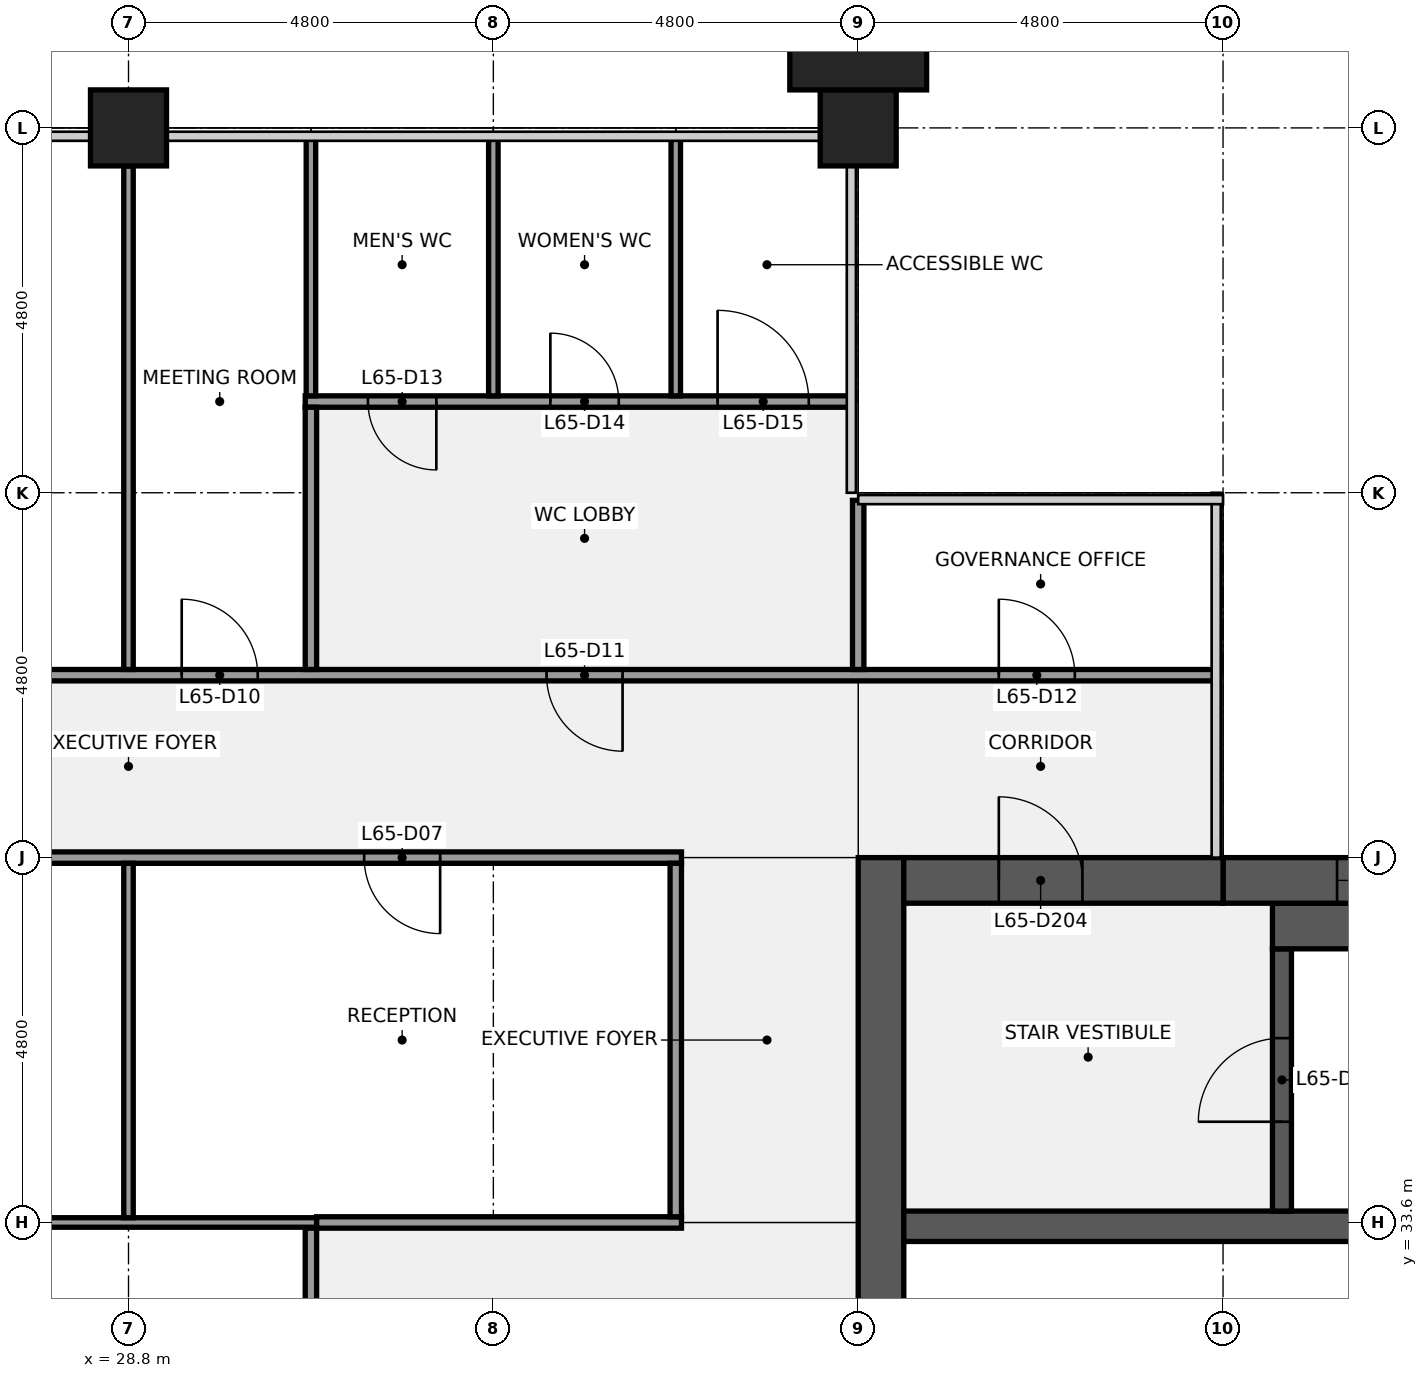
"""IFC4 building model, lengths in metres.
Left out: names, types, materials, properties, quantities, classifications, styles, units other than length and angle.
Written with IfcOpenShell. Run it as: python <this file> out.ifc"""

import sys

from ifc_helpers import new_model, si_unit, direction, frame, frame_2d, origin, origin_2d, place, context, subcontext, project, spatial, rectangle, extrude, element, fill, save


model = new_model("IFC4")
c1 = context("Model", 3, precision=1e-05, world=origin(), true_north=direction((0.0, 1.0)))
c2 = subcontext(c1, "Body", "Model", "MODEL_VIEW")
j1 = project(units=[si_unit("LENGTHUNIT", "METRE"), si_unit("PLANEANGLEUNIT", "RADIAN")], contexts=[c1])
p1 = place(None, origin())
s1 = spatial("IfcSite", under=j1, at=p1, CompositionType="ELEMENT")
p2 = place(p1, origin())
s2 = spatial("IfcBuilding", under=s1, at=p2, CompositionType="ELEMENT")
p3 = place(p2, frame((0.0, 0.0, 298.3)))
s3 = spatial("IfcBuildingStorey", under=s2, at=p3, CompositionType="ELEMENT", Elevation=298.3)
for number, where, z_axis, x_axis in (
    (1, (28.8, 48.0, 0.0), (0.0, 0.0, 1.0), (1.0, 0.0, 0.0)),
    (2, (38.4, 48.0, 0.0), (0.0, 0.0, 1.0), (1.0, 0.0, 0.0)),
):
    element("IfcColumn", number, at=place(p3, frame(where, z_axis=z_axis, x_axis=x_axis)), inside=s3, PredefinedType="COLUMN", context=c2, shape_type="SweptSolid", body=[
        extrude(rectangle(XDim=1.0, YDim=1.0, at=origin_2d()), origin(), (0.0, 0.0, 1.0), 4.0),
    ])
p4 = place(p3, frame((38.7, 9.6, 0.0), z_axis=(0.0, 0.0, 1.0), x_axis=(0.0, 1.0, 0.0)))
e3 = element("IfcWall", 3, at=p4, inside=s3, PredefinedType="SHEAR", context=c2, shape_type="SweptSolid", body=[
    extrude(rectangle(XDim=28.8, YDim=0.6, at=frame_2d((14.4, 0.0))), origin(), (0.0, 0.0, 1.0), 3.84),
])
p5 = place(p4, frame((8.7, 0.0, 0.0)))
e4 = element("IfcOpeningElement", 4, at=p5, cuts=e3, PredefinedType="OPENING", context=c2, shape_type="SweptSolid", body=[
    extrude(rectangle(XDim=1.8, YDim=2.1, at=frame_2d((0.9, 1.05))), frame((0.0, 0.31, 0.0), z_axis=(0.0, -1.0, 0.0), x_axis=(1.0, 0.0, 0.0)), (0.0, 0.0, 1.0), 0.62),
])
p6 = place(p4, frame((18.3, 0.0, 0.0)))
e5 = element("IfcOpeningElement", 5, at=p6, cuts=e3, PredefinedType="OPENING", context=c2, shape_type="SweptSolid", body=[
    extrude(rectangle(XDim=1.8, YDim=2.1, at=frame_2d((0.9, 1.05))), frame((0.0, 0.31, 0.0), z_axis=(0.0, -1.0, 0.0), x_axis=(1.0, 0.0, 0.0)), (0.0, 0.0, 1.0), 0.62),
])
p7 = place(p3, frame((39.0, 33.55, 0.0), z_axis=(0.0, 0.0, 1.0), x_axis=(1.0, 0.0, 0.0)))
e6 = element("IfcWall", 6, at=p7, inside=s3, PredefinedType="SHEAR", context=c2, shape_type="SweptSolid", body=[
    extrude(rectangle(XDim=18.0, YDim=0.4, at=frame_2d((9.0, 0.0))), origin(), (0.0, 0.0, 1.0), 3.84),
])
p8 = place(p3, frame((43.975, 33.75, 0.0), z_axis=(0.0, 0.0, 1.0), x_axis=(0.0, 1.0, 0.0)))
e7 = element("IfcWall", 7, at=p8, inside=s3, PredefinedType="SHEAR", context=c2, shape_type="SweptSolid", body=[
    extrude(rectangle(XDim=3.45, YDim=0.25, at=frame_2d((1.725, 0.0))), origin(), (0.0, 0.0, 1.0), 3.84),
])
p9 = place(p8, frame((1.175, 0.0, 0.0)))
e8 = element("IfcOpeningElement", 8, at=p9, cuts=e7, PredefinedType="OPENING", context=c2, shape_type="SweptSolid", body=[
    extrude(rectangle(XDim=1.1, YDim=2.1, at=frame_2d((0.55, 1.05))), frame((0.0, 0.135, 0.0), z_axis=(0.0, -1.0, 0.0), x_axis=(1.0, 0.0, 0.0)), (0.0, 0.0, 1.0), 0.27),
])
p10 = place(p3, frame((43.85, 37.5, 0.0), z_axis=(0.0, 0.0, 1.0), x_axis=(1.0, 0.0, 0.0)))
e9 = element("IfcWall", 9, at=p10, inside=s3, PredefinedType="SHEAR", context=c2, shape_type="SweptSolid", body=[
    extrude(rectangle(XDim=7.5, YDim=0.6, at=frame_2d((3.75, 0.0))), origin(), (0.0, 0.0, 1.0), 3.84),
])
p11 = place(p3, frame((43.2, 38.1, 0.0), z_axis=(0.0, 0.0, 1.0), x_axis=(1.0, 0.0, 0.0)))
e10 = element("IfcWall", 10, at=p11, inside=s3, PredefinedType="SHEAR", context=c2, shape_type="SweptSolid", body=[
    extrude(rectangle(XDim=13.8, YDim=0.6, at=frame_2d((6.9, 0.0))), origin(), (0.0, 0.0, 1.0), 3.84),
])
p12 = place(p11, frame((6.3, 0.0, 0.9)))
e11 = element("IfcOpeningElement", 11, at=p12, cuts=e10, PredefinedType="OPENING", context=c2, shape_type="SweptSolid", body=[
    extrude(rectangle(XDim=1.8, YDim=1.5, at=frame_2d((0.9, 0.75))), frame((0.0, 0.31, 0.0), z_axis=(0.0, -1.0, 0.0), x_axis=(1.0, 0.0, 0.0)), (0.0, 0.0, 1.0), 0.62),
])
p13 = place(p11, frame((1.5, 0.0, 0.9)))
e12 = element("IfcOpeningElement", 12, at=p13, cuts=e10, PredefinedType="OPENING", context=c2, shape_type="SweptSolid", body=[
    extrude(rectangle(XDim=1.8, YDim=1.5, at=frame_2d((0.9, 0.75))), frame((0.0, 0.31, 0.0), z_axis=(0.0, -1.0, 0.0), x_axis=(1.0, 0.0, 0.0)), (0.0, 0.0, 1.0), 0.62),
])
p14 = place(p3, frame((39.0, 38.1, 0.0), z_axis=(0.0, 0.0, 1.0), x_axis=(1.0, 0.0, 0.0)))
e13 = element("IfcWall", 13, at=p14, inside=s3, PredefinedType="SHEAR", context=c2, shape_type="SweptSolid", body=[
    extrude(rectangle(XDim=4.2, YDim=0.6, at=frame_2d((2.1, 0.0))), origin(), (0.0, 0.0, 1.0), 3.84),
])
p15 = place(p14, frame((1.25, 0.0, 0.0)))
e14 = element("IfcOpeningElement", 14, at=p15, cuts=e13, PredefinedType="OPENING", context=c2, shape_type="SweptSolid", body=[
    extrude(rectangle(XDim=1.1, YDim=2.1, at=frame_2d((0.55, 1.05))), frame((0.0, 0.31, 0.0), z_axis=(0.0, -1.0, 0.0), x_axis=(1.0, 0.0, 0.0)), (0.0, 0.0, 1.0), 0.62),
])
p16 = place(p3, frame((26.475, 33.6, 0.0), z_axis=(0.0, 0.0, 1.0), x_axis=(1.0, 0.0, 0.0)))
e15 = element("IfcWall", 15, at=p16, inside=s3, PredefinedType="PARTITIONING", context=c2, shape_type="SweptSolid", body=[
    extrude(rectangle(XDim=4.8, YDim=0.125, at=frame_2d((2.4, 0.0))), origin(), (0.0, 0.0, 1.0), 2.849),
])
p17 = place(p3, frame((31.275, 33.6, 0.0), z_axis=(0.0, 0.0, 1.0), x_axis=(1.0, 0.0, 0.0)))
e16 = element("IfcWall", 16, at=p17, inside=s3, PredefinedType="PARTITIONING", context=c2, shape_type="SweptSolid", body=[
    extrude(rectangle(XDim=4.8, YDim=0.15, at=frame_2d((2.4, 0.0))), origin(), (0.0, 0.0, 1.0), 2.849),
])
p18 = place(p3, frame((21.525, 38.4, 0.0), z_axis=(0.0, 0.0, 1.0), x_axis=(1.0, 0.0, 0.0)))
e17 = element("IfcWall", 17, at=p18, inside=s3, PredefinedType="PARTITIONING", context=c2, shape_type="SweptSolid", body=[
    extrude(rectangle(XDim=14.55, YDim=0.15, at=frame_2d((7.275, 0.0))), origin(), (0.0, 0.0, 1.0), 2.849),
])
p19 = place(p18, frame((3.175, 0.0, 0.0)))
e18 = element("IfcOpeningElement", 18, at=p19, cuts=e17, PredefinedType="OPENING", context=c2, shape_type="SweptSolid", body=[
    extrude(rectangle(XDim=1.0, YDim=2.1, at=frame_2d((0.5, 1.05))), frame((0.0, 0.085, 0.0), z_axis=(0.0, -1.0, 0.0), x_axis=(1.0, 0.0, 0.0)), (0.0, 0.0, 1.0), 0.17),
])
p20 = place(p18, frame((10.375, 0.0, 0.0)))
e19 = element("IfcOpeningElement", 19, at=p20, cuts=e17, PredefinedType="OPENING", context=c2, shape_type="SweptSolid", body=[
    extrude(rectangle(XDim=1.0, YDim=2.1, at=frame_2d((0.5, 1.05))), frame((0.0, 0.085, 0.0), z_axis=(0.0, -1.0, 0.0), x_axis=(1.0, 0.0, 0.0)), (0.0, 0.0, 1.0), 0.17),
])
p21 = place(p3, frame((14.5, 40.8, 0.0), z_axis=(0.0, 0.0, 1.0), x_axis=(1.0, 0.0, 0.0)))
e20 = element("IfcWall", 20, at=p21, inside=s3, PredefinedType="PARTITIONING", context=c2, shape_type="SweptSolid", body=[
    extrude(rectangle(XDim=28.6, YDim=0.15, at=frame_2d((14.3, 0.0))), origin(), (0.0, 0.0, 1.0), 2.849),
])
p22 = place(p21, frame((1.85, 0.0, 0.0)))
e21 = element("IfcOpeningElement", 21, at=p22, cuts=e20, PredefinedType="OPENING", context=c2, shape_type="SweptSolid", body=[
    extrude(rectangle(XDim=1.0, YDim=2.1, at=frame_2d((0.5, 1.05))), frame((0.0, 0.085, 0.0), z_axis=(0.0, -1.0, 0.0), x_axis=(1.0, 0.0, 0.0)), (0.0, 0.0, 1.0), 0.17),
])
p23 = place(p21, frame((9.0, 0.0, 0.0)))
e22 = element("IfcOpeningElement", 22, at=p23, cuts=e20, PredefinedType="OPENING", context=c2, shape_type="SweptSolid", body=[
    extrude(rectangle(XDim=1.0, YDim=2.1, at=frame_2d((0.5, 1.05))), frame((0.0, 0.085, 0.0), z_axis=(0.0, -1.0, 0.0), x_axis=(1.0, 0.0, 0.0)), (0.0, 0.0, 1.0), 0.17),
])
p24 = place(p21, frame((15.0, 0.0, 0.0)))
e23 = element("IfcOpeningElement", 23, at=p24, cuts=e20, PredefinedType="OPENING", context=c2, shape_type="SweptSolid", body=[
    extrude(rectangle(XDim=1.0, YDim=2.1, at=frame_2d((0.5, 1.05))), frame((0.0, 0.085, 0.0), z_axis=(0.0, -1.0, 0.0), x_axis=(1.0, 0.0, 0.0)), (0.0, 0.0, 1.0), 0.17),
])
p25 = place(p21, frame((19.8, 0.0, 0.0)))
e24 = element("IfcOpeningElement", 24, at=p25, cuts=e20, PredefinedType="OPENING", context=c2, shape_type="SweptSolid", body=[
    extrude(rectangle(XDim=1.0, YDim=2.1, at=frame_2d((0.5, 1.05))), frame((0.0, 0.085, 0.0), z_axis=(0.0, -1.0, 0.0), x_axis=(1.0, 0.0, 0.0)), (0.0, 0.0, 1.0), 0.17),
])
p26 = place(p21, frame((25.75, 0.0, 0.0)))
e25 = element("IfcOpeningElement", 25, at=p26, cuts=e20, PredefinedType="OPENING", context=c2, shape_type="SweptSolid", body=[
    extrude(rectangle(XDim=1.0, YDim=2.1, at=frame_2d((0.5, 1.05))), frame((0.0, 0.085, 0.0), z_axis=(0.0, -1.0, 0.0), x_axis=(1.0, 0.0, 0.0)), (0.0, 0.0, 1.0), 0.17),
])
p27 = place(p3, frame((31.125, 44.4, 0.0), z_axis=(0.0, 0.0, 1.0), x_axis=(1.0, 0.0, 0.0)))
e26 = element("IfcWall", 26, at=p27, inside=s3, PredefinedType="PARTITIONING", context=c2, shape_type="SweptSolid", body=[
    extrude(rectangle(XDim=7.175, YDim=0.15, at=frame_2d((3.587, 0.0))), origin(), (0.0, 0.0, 1.0), 2.849),
])
p28 = place(p27, frame((0.825, 0.0, 0.0)))
e27 = element("IfcOpeningElement", 27, at=p28, cuts=e26, PredefinedType="OPENING", context=c2, shape_type="SweptSolid", body=[
    extrude(rectangle(XDim=0.9, YDim=2.1, at=frame_2d((0.45, 1.05))), frame((0.0, 0.085, 0.0), z_axis=(0.0, -1.0, 0.0), x_axis=(1.0, 0.0, 0.0)), (0.0, 0.0, 1.0), 0.17),
])
p29 = place(p27, frame((3.225, 0.0, 0.0)))
e28 = element("IfcOpeningElement", 28, at=p29, cuts=e26, PredefinedType="OPENING", context=c2, shape_type="SweptSolid", body=[
    extrude(rectangle(XDim=0.9, YDim=2.1, at=frame_2d((0.45, 1.05))), frame((0.0, 0.085, 0.0), z_axis=(0.0, -1.0, 0.0), x_axis=(1.0, 0.0, 0.0)), (0.0, 0.0, 1.0), 0.17),
])
p30 = place(p27, frame((5.425, 0.0, 0.0)))
e29 = element("IfcOpeningElement", 29, at=p30, cuts=e26, PredefinedType="OPENING", context=c2, shape_type="SweptSolid", body=[
    extrude(rectangle(XDim=1.2, YDim=2.1, at=frame_2d((0.6, 1.05))), frame((0.0, 0.085, 0.0), z_axis=(0.0, -1.0, 0.0), x_axis=(1.0, 0.0, 0.0)), (0.0, 0.0, 1.0), 0.17),
])
p31 = place(p3, frame((28.8, 33.663, 0.0), z_axis=(0.0, 0.0, 1.0), x_axis=(0.0, 1.0, 0.0)))
e30 = element("IfcWall", 30, at=p31, inside=s3, PredefinedType="PARTITIONING", context=c2, shape_type="SweptSolid", body=[
    extrude(rectangle(XDim=4.662, YDim=0.125, at=frame_2d((2.331, 0.0))), origin(), (0.0, 0.0, 1.0), 2.849),
])
p32 = place(p3, frame((28.8, 40.875, 0.0), z_axis=(0.0, 0.0, 1.0), x_axis=(0.0, 1.0, 0.0)))
e31 = element("IfcWall", 31, at=p32, inside=s3, PredefinedType="PARTITIONING", context=c2, shape_type="SweptSolid", body=[
    extrude(rectangle(XDim=6.625, YDim=0.125, at=frame_2d((3.312, 0.0))), origin(), (0.0, 0.0, 1.0), 2.849),
])
p33 = place(p3, frame((31.2, 44.475, 0.0), z_axis=(0.0, 0.0, 1.0), x_axis=(0.0, 1.0, 0.0)))
e32 = element("IfcWall", 32, at=p33, inside=s3, PredefinedType="PARTITIONING", context=c2, shape_type="SweptSolid", body=[
    extrude(rectangle(XDim=3.425, YDim=0.125, at=frame_2d((1.712, 0.0))), origin(), (0.0, 0.0, 1.0), 2.849),
])
p34 = place(p3, frame((31.2, 26.475, 0.0), z_axis=(0.0, 0.0, 1.0), x_axis=(0.0, 1.0, 0.0)))
e33 = element("IfcWall", 33, at=p34, inside=s3, PredefinedType="PARTITIONING", context=c2, shape_type="SweptSolid", body=[
    extrude(rectangle(XDim=7.05, YDim=0.15, at=frame_2d((3.525, 0.0))), origin(), (0.0, 0.0, 1.0), 2.849),
])
p35 = place(p3, frame((31.2, 40.875, 0.0), z_axis=(0.0, 0.0, 1.0), x_axis=(0.0, 1.0, 0.0)))
e34 = element("IfcWall", 34, at=p35, inside=s3, PredefinedType="PARTITIONING", context=c2, shape_type="SweptSolid", body=[
    extrude(rectangle(XDim=3.45, YDim=0.15, at=frame_2d((1.725, 0.0))), origin(), (0.0, 0.0, 1.0), 2.849),
])
for number, where, z_axis, x_axis in (
    (35, (33.6, 44.475, 0.0), (0.0, 0.0, 1.0), (0.0, 1.0, 0.0)),
    (36, (36.0, 44.475, 0.0), (0.0, 0.0, 1.0), (0.0, 1.0, 0.0)),
):
    element("IfcWall", number, at=place(p3, frame(where, z_axis=z_axis, x_axis=x_axis)), inside=s3, PredefinedType="PARTITIONING", context=c2, shape_type="SweptSolid", body=[
        extrude(rectangle(XDim=3.425, YDim=0.125, at=frame_2d((1.712, 0.0))), origin(), (0.0, 0.0, 1.0), 2.849),
    ])
p36 = place(p3, frame((36.0, 33.675, 0.0), z_axis=(0.0, 0.0, 1.0), x_axis=(0.0, 1.0, 0.0)))
e37 = element("IfcWall", 37, at=p36, inside=s3, PredefinedType="PARTITIONING", context=c2, shape_type="SweptSolid", body=[
    extrude(rectangle(XDim=4.65, YDim=0.15, at=frame_2d((2.325, 0.0))), origin(), (0.0, 0.0, 1.0), 2.849),
])
p37 = place(p3, frame((38.4, 40.875, 0.0), z_axis=(0.0, 0.0, 1.0), x_axis=(0.0, 1.0, 0.0)))
e38 = element("IfcWall", 38, at=p37, inside=s3, PredefinedType="PARTITIONING", context=c2, shape_type="SweptSolid", body=[
    extrude(rectangle(XDim=2.225, YDim=0.15, at=frame_2d((1.113, 0.0))), origin(), (0.0, 0.0, 1.0), 2.849),
])
p38 = place(p3, frame((38.4, 49.0, 0.0), z_axis=(0.0, 0.0, 1.0), x_axis=(1.0, 0.0, 0.0)))
e39 = element("IfcColumn", 39, at=p38, inside=s3, PredefinedType="PILASTER", context=c2, shape_type="SweptSolid", body=[
    extrude(rectangle(XDim=1.8, YDim=1.0, at=origin_2d()), origin(), (0.0, 0.0, 1.0), 4.0),
])
p39 = place(p9, origin())
e40 = element("IfcDoor", 40, at=p39, inside=s3, OperationType="SINGLE_SWING_LEFT", PredefinedType="DOOR", context=c2, shape_type="SweptSolid", body=[
    extrude(rectangle(XDim=1.1, YDim=2.1, at=frame_2d((0.55, 1.05))), frame((0.0, 0.025, 0.0), z_axis=(0.0, -1.0, 0.0), x_axis=(1.0, 0.0, 0.0)), (0.0, 0.0, 1.0), 0.05),
])
fill(e8, e40)
p40 = place(p15, origin())
e41 = element("IfcDoor", 41, at=p40, inside=s3, OperationType="SINGLE_SWING_LEFT", PredefinedType="DOOR", context=c2, shape_type="SweptSolid", body=[
    extrude(rectangle(XDim=1.1, YDim=2.1, at=frame_2d((0.55, 1.05))), frame((0.0, 0.025, 0.0), z_axis=(0.0, -1.0, 0.0), x_axis=(1.0, 0.0, 0.0)), (0.0, 0.0, 1.0), 0.05),
])
fill(e14, e41)
p41 = place(p13, origin())
e42 = element("IfcWindow", 42, at=p41, inside=s3, PartitioningType="SINGLE_PANEL", PredefinedType="WINDOW", context=c2, shape_type="SweptSolid", body=[
    extrude(rectangle(XDim=1.8, YDim=1.5, at=frame_2d((0.9, 0.75))), frame((0.0, 0.03, 0.0), z_axis=(0.0, -1.0, 0.0), x_axis=(1.0, 0.0, 0.0)), (0.0, 0.0, 1.0), 0.06),
])
fill(e12, e42)
p42 = place(p20, origin())
e43 = element("IfcDoor", 43, at=p42, inside=s3, OperationType="SINGLE_SWING_RIGHT", PredefinedType="DOOR", context=c2, shape_type="SweptSolid", body=[
    extrude(rectangle(XDim=1.0, YDim=2.1, at=frame_2d((0.5, 1.05))), frame((0.0, 0.025, 0.0), z_axis=(0.0, -1.0, 0.0), x_axis=(1.0, 0.0, 0.0)), (0.0, 0.0, 1.0), 0.05),
])
fill(e19, e43)
p43 = place(p24, origin())
e44 = element("IfcDoor", 44, at=p43, inside=s3, OperationType="SINGLE_SWING_LEFT", PredefinedType="DOOR", context=c2, shape_type="SweptSolid", body=[
    extrude(rectangle(XDim=1.0, YDim=2.1, at=frame_2d((0.5, 1.05))), frame((0.0, 0.025, 0.0), z_axis=(0.0, -1.0, 0.0), x_axis=(1.0, 0.0, 0.0)), (0.0, 0.0, 1.0), 0.05),
])
fill(e23, e44)
p44 = place(p25, origin())
e45 = element("IfcDoor", 45, at=p44, inside=s3, OperationType="SINGLE_SWING_RIGHT", PredefinedType="DOOR", context=c2, shape_type="SweptSolid", body=[
    extrude(rectangle(XDim=1.0, YDim=2.1, at=frame_2d((0.5, 1.05))), frame((0.0, 0.025, 0.0), z_axis=(0.0, -1.0, 0.0), x_axis=(1.0, 0.0, 0.0)), (0.0, 0.0, 1.0), 0.05),
])
fill(e24, e45)
p45 = place(p26, origin())
e46 = element("IfcDoor", 46, at=p45, inside=s3, OperationType="SINGLE_SWING_LEFT", PredefinedType="DOOR", context=c2, shape_type="SweptSolid", body=[
    extrude(rectangle(XDim=1.0, YDim=2.1, at=frame_2d((0.5, 1.05))), frame((0.0, 0.025, 0.0), z_axis=(0.0, -1.0, 0.0), x_axis=(1.0, 0.0, 0.0)), (0.0, 0.0, 1.0), 0.05),
])
fill(e25, e46)
p46 = place(p28, origin())
e47 = element("IfcDoor", 47, at=p46, inside=s3, OperationType="SINGLE_SWING_RIGHT", PredefinedType="DOOR", context=c2, shape_type="SweptSolid", body=[
    extrude(rectangle(XDim=0.9, YDim=2.1, at=frame_2d((0.45, 1.05))), frame((0.0, 0.025, 0.0), z_axis=(0.0, -1.0, 0.0), x_axis=(1.0, 0.0, 0.0)), (0.0, 0.0, 1.0), 0.05),
])
fill(e27, e47)
p47 = place(p29, origin())
e48 = element("IfcDoor", 48, at=p47, inside=s3, OperationType="SINGLE_SWING_LEFT", PredefinedType="DOOR", context=c2, shape_type="SweptSolid", body=[
    extrude(rectangle(XDim=0.9, YDim=2.1, at=frame_2d((0.45, 1.05))), frame((0.0, 0.025, 0.0), z_axis=(0.0, -1.0, 0.0), x_axis=(1.0, 0.0, 0.0)), (0.0, 0.0, 1.0), 0.05),
])
fill(e28, e48)
p48 = place(p30, origin())
e49 = element("IfcDoor", 49, at=p48, inside=s3, OperationType="SINGLE_SWING_LEFT", PredefinedType="DOOR", context=c2, shape_type="SweptSolid", body=[
    extrude(rectangle(XDim=1.2, YDim=2.1, at=frame_2d((0.6, 1.05))), frame((0.0, 0.025, 0.0), z_axis=(0.0, -1.0, 0.0), x_axis=(1.0, 0.0, 0.0)), (0.0, 0.0, 1.0), 0.05),
])
fill(e29, e49)
save(model, sys.argv[1])
